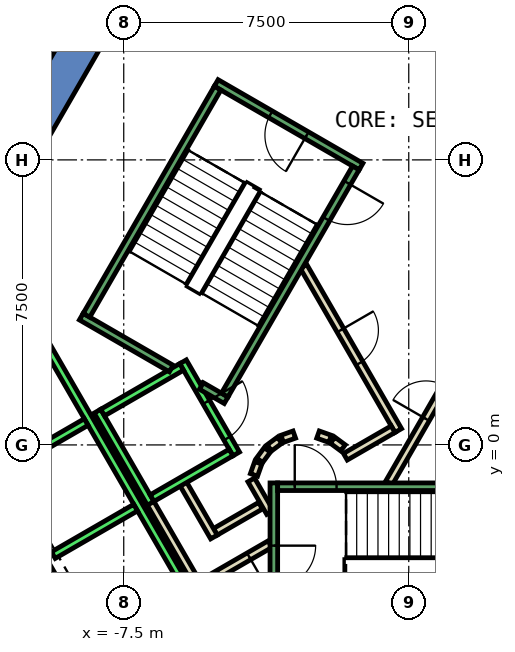
"""IFC4 building model, lengths in metres.
Left out: names, types, materials, properties, quantities, classifications, styles, units other than length and angle.
Written with IfcOpenShell. Run it as: python <this file> out.ifc"""

import sys

from ifc_helpers import new_model, si_unit, direction, frame, frame_2d, origin, place, context, subcontext, project, spatial, polyline, rectangle, outline, extrude, element, fill, save


model = new_model("IFC4")
c1 = context("Model", 3, precision=1e-05, world=origin(), true_north=direction((0.0, 1.0)))
c2 = subcontext(c1, "Body", "Model", "MODEL_VIEW")
j1 = project(units=[si_unit("LENGTHUNIT", "METRE"), si_unit("PLANEANGLEUNIT", "RADIAN")], contexts=[c1])
p1 = place(None, origin())
s1 = spatial("IfcSite", under=j1, at=p1, CompositionType="ELEMENT")
p2 = place(p1, origin())
s2 = spatial("IfcBuilding", under=s1, at=p2, CompositionType="ELEMENT")
p3 = place(p2, frame((0.0, 0.0, 47.6)))
s3 = spatial("IfcBuildingStorey", under=s2, at=p3, CompositionType="ELEMENT", Elevation=47.6)
p4 = place(p3, frame((0.0, 0.0, -0.4)))
e1 = element("IfcWall", 1, at=p4, inside=s3, PredefinedType="SHEAR", context=c2, shape_type="SweptSolid", body=[
    extrude(outline(polyline([(-12.267, 5.252), (-11.402, 4.752), (-6.351, 13.5), (-6.928, 14.5), (-12.267, 5.252)])), origin(), (0.0, 0.0, 1.0), 4.2),
])
p5 = place(p3, frame((0.0, 0.0, -0.4)))
e2 = element("IfcWall", 2, at=p5, inside=s3, PredefinedType="SHEAR", context=c2, shape_type="SweptSolid", body=[
    extrude(outline(polyline([(-13.856, 2.5), (-6.928, -9.5), (-6.351, -8.5), (-12.702, 2.5), (-13.856, 2.5)])), origin(), (0.0, 0.0, 1.0), 4.2),
])
p6 = place(p3, frame((-3.9, -1.599, 0.0), z_axis=(0.0, 0.0, 1.0), x_axis=(-0.865969445389, -0.500096910261, 0.0)))
e3 = element("IfcWall", 3, at=p6, inside=s3, PredefinedType="PARTITIONING", context=c2, shape_type="SweptSolid", body=[
    extrude(rectangle(XDim=1.373, YDim=0.2, at=frame_2d((0.687, 0.0))), origin(), (0.0, 0.0, 1.0), 3.8),
])
p7 = place(p3, frame((-5.126, -2.422, 0.0), z_axis=(0.0, 0.0, 1.0), x_axis=(-0.500062241894, 0.865989465428, 0.0)))
e4 = element("IfcWall", 4, at=p7, inside=s3, PredefinedType="PARTITIONING", context=c2, shape_type="SweptSolid", body=[
    extrude(rectangle(XDim=1.7, YDim=0.2, at=frame_2d((0.85, 0.0))), origin(), (0.0, 0.0, 1.0), 3.8),
])
p8 = place(p3, frame((-3.65, -2.61, 0.0), z_axis=(0.0, 0.0, 1.0), x_axis=(-0.866072462134, -0.499918483688, 0.0)))
e5 = element("IfcWall", 5, at=p8, inside=s3, PredefinedType="PARTITIONING", context=c2, shape_type="SweptSolid", body=[
    extrude(rectangle(XDim=2.084, YDim=0.2, at=frame_2d((1.042, 0.0))), origin(), (0.0, 0.0, 1.0), 3.8),
])
p9 = place(p8, frame((0.642, 0.0, 0.0)))
e6 = element("IfcOpeningElement", 6, at=p9, cuts=e5, PredefinedType="OPENING", context=c2, shape_type="SweptSolid", body=[
    extrude(rectangle(XDim=0.9, YDim=2.1, at=frame_2d((0.45, 1.05))), frame((0.0, 0.11, 0.0), z_axis=(0.0, -1.0, 0.0), x_axis=(1.0, 0.0, 0.0)), (0.0, 0.0, 1.0), 0.22),
])
p10 = place(p3, frame((-5.492, -3.788, 0.0), z_axis=(0.0, 0.0, 1.0), x_axis=(-0.500008949224, 0.866020236886, 0.0)))
e7 = element("IfcWall", 7, at=p10, inside=s3, PredefinedType="PARTITIONING", context=c2, shape_type="SweptSolid", body=[
    extrude(rectangle(XDim=2.68, YDim=0.2, at=frame_2d((1.34, 0.0))), origin(), (0.0, 0.0, 1.0), 3.8),
])
p11 = place(p3, frame((-4.145, -0.92, 0.0), z_axis=(0.0, 0.0, 1.0), x_axis=(0.499743786207, -0.866173278362, 0.0)))
e8 = element("IfcWall", 8, at=p11, inside=s3, PredefinedType="PARTITIONING", context=c2, shape_type="SweptSolid", body=[
    extrude(rectangle(XDim=0.991, YDim=0.2, at=frame_2d((0.495, 0.0))), origin(), (0.0, 0.0, 1.0), 3.8),
])
p12 = place(p3, frame((-0.52, -1.0, 0.0), z_axis=(0.0, 0.0, 1.0), x_axis=(0.50011622646, 0.865958290007, 0.0)))
e9 = element("IfcWall", 9, at=p12, inside=s3, PredefinedType="PARTITIONING", context=c2, shape_type="SweptSolid", body=[
    extrude(rectangle(XDim=4.991, YDim=0.2, at=frame_2d((2.496, 0.0))), origin(), (0.0, 0.0, 1.0), 3.8),
])
p13 = place(p12, frame((1.945, 0.0, 0.0)))
e10 = element("IfcOpeningElement", 10, at=p13, cuts=e9, PredefinedType="OPENING", context=c2, shape_type="SweptSolid", body=[
    extrude(rectangle(XDim=1.0, YDim=2.1, at=frame_2d((0.5, 1.05))), frame((0.0, 0.11, 0.0), z_axis=(0.0, -1.0, 0.0), x_axis=(1.0, 0.0, 0.0)), (0.0, 0.0, 1.0), 0.22),
])
p14 = place(p3, frame((-2.771, 4.7, 0.0), z_axis=(0.0, 0.0, 1.0), x_axis=(0.499969479948, -0.866043023828, 0.0)))
e11 = element("IfcWall", 11, at=p14, inside=s3, PredefinedType="PARTITIONING", context=c2, shape_type="SweptSolid", body=[
    extrude(rectangle(XDim=4.99, YDim=0.2, at=frame_2d((2.495, 0.0))), origin(), (0.0, 0.0, 1.0), 3.8),
])
p15 = place(p14, frame((1.945, 0.0, 0.0)))
e12 = element("IfcOpeningElement", 12, at=p15, cuts=e11, PredefinedType="OPENING", context=c2, shape_type="SweptSolid", body=[
    extrude(rectangle(XDim=1.0, YDim=2.1, at=frame_2d((0.5, 1.05))), frame((0.0, 0.11, 0.0), z_axis=(0.0, -1.0, 0.0), x_axis=(1.0, 0.0, 0.0)), (0.0, 0.0, 1.0), 0.22),
])
p16 = place(p3, frame((-0.412, 0.414, 0.0), z_axis=(0.0, 0.0, 1.0), x_axis=(-0.866017369001, -0.500013916395, 0.0)))
e13 = element("IfcWall", 13, at=p16, inside=s3, PredefinedType="PARTITIONING", context=c2, shape_type="SweptSolid", body=[
    extrude(rectangle(XDim=1.45, YDim=0.2, at=frame_2d((0.725, 0.0))), origin(), (0.0, 0.0, 1.0), 3.8),
])
p17 = place(p3, frame((-1.731, -0.077, 0.0), z_axis=(0.0, 0.0, 1.0), x_axis=(-0.804311165252, 0.594208338422, 0.0)))
e14 = element("IfcWall", 14, at=p17, inside=s3, PredefinedType="PARTITIONING", context=c2, shape_type="SweptSolid", body=[
    extrude(rectangle(XDim=0.338, YDim=0.2, at=frame_2d((0.169, 0.0))), origin(), (0.0, 0.0, 1.0), 3.8),
])
p18 = place(p3, frame((-2.07, 0.16, 0.0), z_axis=(0.0, 0.0, 1.0), x_axis=(-0.942199461132, 0.335052496547, 0.0)))
e15 = element("IfcWall", 15, at=p18, inside=s3, PredefinedType="PARTITIONING", context=c2, shape_type="SweptSolid", body=[
    extrude(rectangle(XDim=0.337, YDim=0.2, at=frame_2d((0.169, 0.0))), origin(), (0.0, 0.0, 1.0), 3.8),
])
p19 = place(p3, frame((-3.012, 0.273, 0.0), z_axis=(0.0, 0.0, 1.0), x_axis=(-0.942280615813, -0.334824194261, 0.0)))
e16 = element("IfcWall", 16, at=p19, inside=s3, PredefinedType="PARTITIONING", context=c2, shape_type="SweptSolid", body=[
    extrude(rectangle(XDim=0.338, YDim=0.2, at=frame_2d((0.169, 0.0))), origin(), (0.0, 0.0, 1.0), 3.8),
])
p20 = place(p3, frame((-3.397, 0.124, 0.0), z_axis=(0.0, 0.0, 1.0), x_axis=(-0.804311165252, -0.594208338422, 0.0)))
e17 = element("IfcWall", 17, at=p20, inside=s3, PredefinedType="PARTITIONING", context=c2, shape_type="SweptSolid", body=[
    extrude(rectangle(XDim=0.338, YDim=0.2, at=frame_2d((0.169, 0.0))), origin(), (0.0, 0.0, 1.0), 3.8),
])
p21 = place(p3, frame((-3.723, -0.131, 0.0), z_axis=(0.0, 0.0, 1.0), x_axis=(-0.594675113454, -0.803966112121, 0.0)))
e18 = element("IfcWall", 18, at=p21, inside=s3, PredefinedType="PARTITIONING", context=c2, shape_type="SweptSolid", body=[
    extrude(rectangle(XDim=0.338, YDim=0.2, at=frame_2d((0.169, 0.0))), origin(), (0.0, 0.0, 1.0), 3.8),
])
p22 = place(p3, frame((-3.96, -0.47, 0.0), z_axis=(0.0, 0.0, 1.0), x_axis=(-0.334824194261, -0.942280615813, 0.0)))
e19 = element("IfcWall", 19, at=p22, inside=s3, PredefinedType="PARTITIONING", context=c2, shape_type="SweptSolid", body=[
    extrude(rectangle(XDim=0.338, YDim=0.2, at=frame_2d((0.169, 0.0))), origin(), (0.0, 0.0, 1.0), 3.8),
])
p23 = place(p3, frame((-5.94, 2.188, 0.0), z_axis=(0.0, 0.0, 1.0), x_axis=(0.49994636267, -0.866056369097, 0.0)))
e20 = element("IfcWall", 20, at=p23, inside=s3, PredefinedType="STANDARD", context=c2, shape_type="SweptSolid", body=[
    extrude(rectangle(XDim=2.8, YDim=0.2, at=frame_2d((1.4, 0.0))), origin(), (0.0, 0.0, 1.0), 3.8),
])
p24 = place(p23, frame((1.225, 0.0, 0.0)))
e21 = element("IfcOpeningElement", 21, at=p24, cuts=e20, PredefinedType="OPENING", context=c2, shape_type="SweptSolid", body=[
    extrude(rectangle(XDim=1.1, YDim=2.1, at=frame_2d((0.55, 1.05))), frame((0.0, 0.11, 0.0), z_axis=(0.0, -1.0, 0.0), x_axis=(1.0, 0.0, 0.0)), (0.0, 0.0, 1.0), 0.22),
])
p25 = place(p3, frame((-8.192, 0.888, 0.0), z_axis=(0.0, 0.0, 1.0), x_axis=(0.49994636267, -0.866056369097, 0.0)))
e22 = element("IfcWall", 22, at=p25, inside=s3, PredefinedType="STANDARD", context=c2, shape_type="SweptSolid", body=[
    extrude(rectangle(XDim=2.8, YDim=0.2, at=frame_2d((1.4, 0.0))), origin(), (0.0, 0.0, 1.0), 3.8),
])
for number, where, z_axis, x_axis in (
    (23, (-5.977, 2.052, 0.0), (0.0, 0.0, 1.0), (-0.866, -0.5, 0.0)),
    (24, (-4.677, -0.2, 0.0), (0.0, 0.0, 1.0), (-0.866, -0.5, 0.0)),
):
    element("IfcWall", number, at=place(p3, frame(where, z_axis=z_axis, x_axis=x_axis)), inside=s3, PredefinedType="STANDARD", context=c2, shape_type="SweptSolid", body=[
        extrude(rectangle(XDim=2.399, YDim=0.2, at=frame_2d((1.2, 0.0))), origin(), (0.0, 0.0, 1.0), 3.8),
    ])
p26 = place(p3, frame((-9.751, 2.99, 0.0), z_axis=(0.0, 0.0, 1.0), x_axis=(0.50000090737, -0.866024879913, 0.0)))
e25 = element("IfcWall", 25, at=p26, inside=s3, PredefinedType="STANDARD", context=c2, shape_type="SweptSolid", body=[
    extrude(rectangle(XDim=10.6, YDim=0.2, at=frame_2d((5.3, 0.0))), origin(), (0.0, 0.0, 1.0), 3.8),
])
for number, where, z_axis, x_axis in (
    (26, (-8.488, 0.602, 0.0), (0.0, 0.0, 1.0), (-0.866, -0.5, 0.0)),
    (27, (-7.188, -1.65, 0.0), (0.0, 0.0, 1.0), (-0.866, -0.5, 0.0)),
):
    element("IfcWall", number, at=place(p3, frame(where, z_axis=z_axis, x_axis=x_axis)), inside=s3, PredefinedType="STANDARD", context=c2, shape_type="SweptSolid", body=[
        extrude(rectangle(XDim=2.5, YDim=0.2, at=frame_2d((1.25, 0.0))), origin(), (0.0, 0.0, 1.0), 3.8),
    ])
p27 = place(p3, frame((-3.55, -1.0, 0.0), z_axis=(0.0, 0.0, 1.0), x_axis=(0.0, -1.0, 0.0)))
e28 = element("IfcWall", 28, at=p27, inside=s3, PredefinedType="STANDARD", context=c2, shape_type="SweptSolid", body=[
    extrude(rectangle(XDim=4.4, YDim=0.2, at=frame_2d((2.2, 0.0))), origin(), (0.0, 0.0, 1.0), 3.8),
])
p28 = place(p27, frame((1.65, 0.0, 0.0)))
e29 = element("IfcOpeningElement", 29, at=p28, cuts=e28, PredefinedType="OPENING", context=c2, shape_type="SweptSolid", body=[
    extrude(rectangle(XDim=1.1, YDim=2.2, at=frame_2d((0.55, 1.1))), frame((0.0, 0.11, 0.0), z_axis=(0.0, -1.0, 0.0), x_axis=(1.0, 0.0, 0.0)), (0.0, 0.0, 1.0), 0.22),
])
p29 = place(p3, frame((-3.45, -1.1, 0.0), z_axis=(0.0, 0.0, 1.0), x_axis=(1.0, 0.0, 0.0)))
e30 = element("IfcWall", 30, at=p29, inside=s3, PredefinedType="STANDARD", context=c2, shape_type="SweptSolid", body=[
    extrude(rectangle(XDim=6.9, YDim=0.2, at=frame_2d((3.45, 0.0))), origin(), (0.0, 0.0, 1.0), 3.8),
])
p30 = place(p29, frame((0.45, 0.0, 0.0)))
e31 = element("IfcOpeningElement", 31, at=p30, cuts=e30, PredefinedType="OPENING", context=c2, shape_type="SweptSolid", body=[
    extrude(rectangle(XDim=1.1, YDim=2.2, at=frame_2d((0.55, 1.1))), frame((0.0, 0.11, 0.0), z_axis=(0.0, -1.0, 0.0), x_axis=(1.0, 0.0, 0.0)), (0.0, 0.0, 1.0), 0.22),
])
p31 = place(p3, frame((-1.256, 7.324, 0.0), z_axis=(0.0, 0.0, 1.0), x_axis=(-0.866046073146, 0.499964197906, 0.0)))
e32 = element("IfcWall", 32, at=p31, inside=s3, PredefinedType="STANDARD", context=c2, shape_type="SweptSolid", body=[
    extrude(rectangle(XDim=4.4, YDim=0.2, at=frame_2d((2.2, 0.0))), origin(), (0.0, 0.0, 1.0), 3.8),
])
p32 = place(p31, frame((1.65, 0.0, 0.0)))
e33 = element("IfcOpeningElement", 33, at=p32, cuts=e32, PredefinedType="OPENING", context=c2, shape_type="SweptSolid", body=[
    extrude(rectangle(XDim=1.1, YDim=2.2, at=frame_2d((0.55, 1.1))), frame((0.0, 0.11, 0.0), z_axis=(0.0, -1.0, 0.0), x_axis=(1.0, 0.0, 0.0)), (0.0, 0.0, 1.0), 0.22),
])
p33 = place(p3, frame((-6.25, 2.01, 0.0), z_axis=(0.0, 0.0, 1.0), x_axis=(-0.86611865017, 0.499838457731, 0.0)))
e34 = element("IfcWall", 34, at=p33, inside=s3, PredefinedType="STANDARD", context=c2, shape_type="SweptSolid", body=[
    extrude(rectangle(XDim=2.733, YDim=0.2, at=frame_2d((1.366, 0.0))), origin(), (0.0, 0.0, 1.0), 3.8),
])
p34 = place(p3, frame((-4.806, 1.176, 0.0), z_axis=(0.0, 0.0, 1.0), x_axis=(-0.866558586415, 0.499075361355, 0.0)))
e35 = element("IfcWall", 35, at=p34, inside=s3, PredefinedType="STANDARD", context=c2, shape_type="SweptSolid", body=[
    extrude(rectangle(XDim=0.751, YDim=0.2, at=frame_2d((0.376, 0.0))), origin(), (0.0, 0.0, 1.0), 3.8),
])
p35 = place(p3, frame((-1.393, 7.288, 0.0), z_axis=(0.0, 0.0, 1.0), x_axis=(-0.499963383562, -0.866046543262, 0.0)))
e36 = element("IfcWall", 36, at=p35, inside=s3, PredefinedType="STANDARD", context=c2, shape_type="SweptSolid", body=[
    extrude(rectangle(XDim=6.9, YDim=0.2, at=frame_2d((3.45, 0.0))), origin(), (0.0, 0.0, 1.0), 3.8),
])
p36 = place(p35, frame((0.45, 0.0, 0.0)))
e37 = element("IfcOpeningElement", 37, at=p36, cuts=e36, PredefinedType="OPENING", context=c2, shape_type="SweptSolid", body=[
    extrude(rectangle(XDim=1.1, YDim=2.2, at=frame_2d((0.55, 1.1))), frame((0.0, 0.11, 0.0), z_axis=(0.0, -1.0, 0.0), x_axis=(1.0, 0.0, 0.0)), (0.0, 0.0, 1.0), 0.22),
])
p37 = place(p3, frame((-5.03, 9.388, 0.0), z_axis=(0.0, 0.0, 1.0), x_axis=(-0.499978703459, -0.866037698999, 0.0)))
e38 = element("IfcWall", 38, at=p37, inside=s3, PredefinedType="STANDARD", context=c2, shape_type="SweptSolid", body=[
    extrude(rectangle(XDim=6.9, YDim=0.2, at=frame_2d((3.45, 0.0))), origin(), (0.0, 0.0, 1.0), 3.8),
])
p38 = place(p13, origin())
e39 = element("IfcDoor", 39, at=p38, inside=s3, OperationType="SINGLE_SWING_LEFT", PredefinedType="DOOR", context=c2, shape_type="SweptSolid", body=[
    extrude(rectangle(XDim=1.0, YDim=2.1, at=frame_2d((0.5, 1.05))), frame((0.0, 0.025, 0.0), z_axis=(0.0, -1.0, 0.0), x_axis=(1.0, 0.0, 0.0)), (0.0, 0.0, 1.0), 0.05),
])
fill(e10, e39)
p39 = place(p15, origin())
e40 = element("IfcDoor", 40, at=p39, inside=s3, OperationType="SINGLE_SWING_RIGHT", PredefinedType="DOOR", context=c2, shape_type="SweptSolid", body=[
    extrude(rectangle(XDim=1.0, YDim=2.1, at=frame_2d((0.5, 1.05))), frame((0.0, 0.025, 0.0), z_axis=(0.0, -1.0, 0.0), x_axis=(1.0, 0.0, 0.0)), (0.0, 0.0, 1.0), 0.05),
])
fill(e12, e40)
p40 = place(p9, origin())
e41 = element("IfcDoor", 41, at=p40, inside=s3, OperationType="SINGLE_SWING_LEFT", PredefinedType="DOOR", context=c2, shape_type="SweptSolid", body=[
    extrude(rectangle(XDim=0.9, YDim=2.1, at=frame_2d((0.45, 1.05))), frame((0.0, 0.025, 0.0), z_axis=(0.0, -1.0, 0.0), x_axis=(1.0, 0.0, 0.0)), (0.0, 0.0, 1.0), 0.05),
])
fill(e6, e41)
p41 = place(p24, origin())
e42 = element("IfcDoor", 42, at=p41, inside=s3, OperationType="SLIDING_TO_LEFT", PredefinedType="DOOR", context=c2, shape_type="SweptSolid", body=[
    extrude(rectangle(XDim=1.1, YDim=2.1, at=frame_2d((0.55, 1.05))), frame((0.0, 0.025, 0.0), z_axis=(0.0, -1.0, 0.0), x_axis=(1.0, 0.0, 0.0)), (0.0, 0.0, 1.0), 0.05),
])
fill(e21, e42)
p42 = place(p30, origin())
e43 = element("IfcDoor", 43, at=p42, inside=s3, OperationType="SINGLE_SWING_LEFT", PredefinedType="DOOR", context=c2, shape_type="SweptSolid", body=[
    extrude(rectangle(XDim=1.1, YDim=2.2, at=frame_2d((0.55, 1.1))), frame((0.0, 0.025, 0.0), z_axis=(0.0, -1.0, 0.0), x_axis=(1.0, 0.0, 0.0)), (0.0, 0.0, 1.0), 0.05),
])
fill(e31, e43)
p43 = place(p28, origin())
e44 = element("IfcDoor", 44, at=p43, inside=s3, OperationType="SINGLE_SWING_LEFT", PredefinedType="DOOR", context=c2, shape_type="SweptSolid", body=[
    extrude(rectangle(XDim=1.1, YDim=2.2, at=frame_2d((0.55, 1.1))), frame((0.0, 0.025, 0.0), z_axis=(0.0, -1.0, 0.0), x_axis=(1.0, 0.0, 0.0)), (0.0, 0.0, 1.0), 0.05),
])
fill(e29, e44)
p44 = place(p36, origin())
e45 = element("IfcDoor", 45, at=p44, inside=s3, OperationType="SINGLE_SWING_LEFT", PredefinedType="DOOR", context=c2, shape_type="SweptSolid", body=[
    extrude(rectangle(XDim=1.1, YDim=2.2, at=frame_2d((0.55, 1.1))), frame((0.0, 0.025, 0.0), z_axis=(0.0, -1.0, 0.0), x_axis=(1.0, 0.0, 0.0)), (0.0, 0.0, 1.0), 0.05),
])
fill(e37, e45)
p45 = place(p32, origin())
e46 = element("IfcDoor", 46, at=p45, inside=s3, OperationType="SINGLE_SWING_LEFT", PredefinedType="DOOR", context=c2, shape_type="SweptSolid", body=[
    extrude(rectangle(XDim=1.1, YDim=2.2, at=frame_2d((0.55, 1.1))), frame((0.0, 0.025, 0.0), z_axis=(0.0, -1.0, 0.0), x_axis=(1.0, 0.0, 0.0)), (0.0, 0.0, 1.0), 0.05),
])
fill(e33, e46)
save(model, sys.argv[1])
